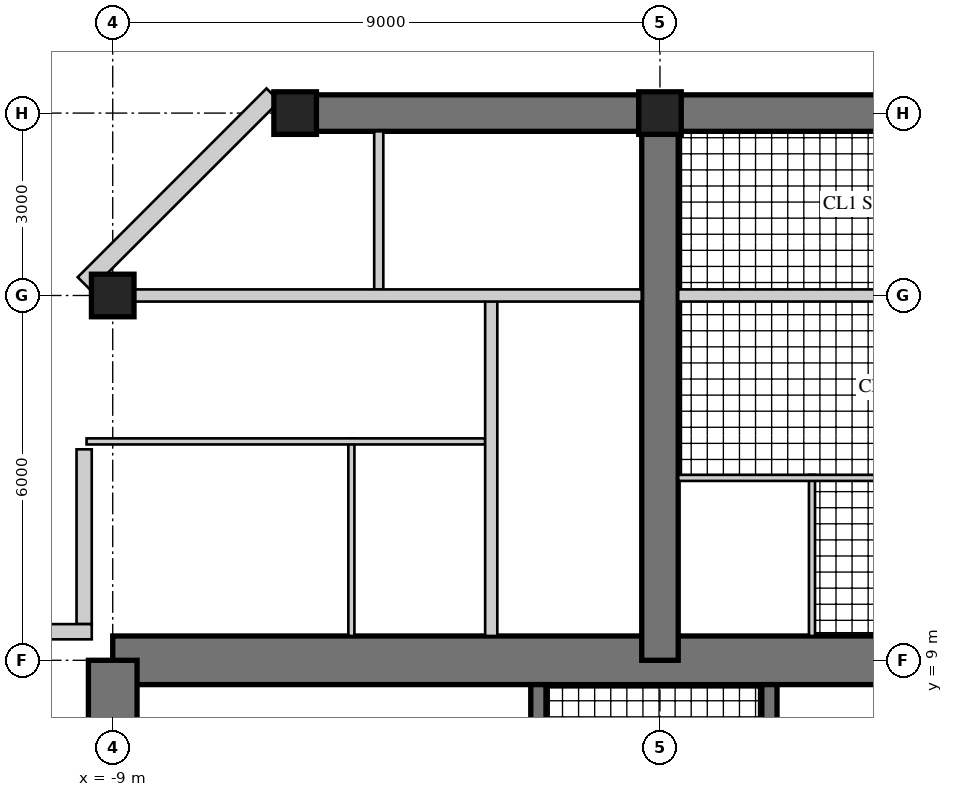
"""IFC4 building model, lengths in metres.
Left out: names, types, materials, properties, quantities, classifications, styles, units other than length and angle.
Written with IfcOpenShell. Run it as: python <this file> out.ifc"""

import sys

from ifc_helpers import new_model, si_unit, direction, frame, frame_2d, origin, origin_2d, place, context, subcontext, project, spatial, rectangle, hollow_rectangle, extrude, element, fill, save


model = new_model("IFC4")
c1 = context("Model", 3, precision=1e-05, world=origin(), true_north=direction((0.0, 1.0)))
c2 = subcontext(c1, "Body", "Model", "MODEL_VIEW")
j1 = project(units=[si_unit("LENGTHUNIT", "METRE"), si_unit("PLANEANGLEUNIT", "RADIAN")], contexts=[c1])
p1 = place(None, origin())
s1 = spatial("IfcSite", under=j1, at=p1, CompositionType="ELEMENT")
p2 = place(p1, origin())
s2 = spatial("IfcBuilding", under=s1, at=p2, CompositionType="ELEMENT")
p3 = place(p2, frame((0.0, 0.0, 261.1)))
s3 = spatial("IfcBuildingStorey", under=s2, at=p3, CompositionType="ELEMENT", Elevation=261.1)
p4 = place(p3, frame((9.0, 9.0, 0.0), z_axis=(0.0, 0.0, 1.0), x_axis=(-1.0, 0.0, 0.0)))
e1 = element("IfcWall", 1, at=p4, inside=s3, PredefinedType="SHEAR", context=c2, shape_type="SweptSolid", body=[
    extrude(rectangle(XDim=18.0, YDim=0.8, at=frame_2d((9.0, 0.0))), origin(), (0.0, 0.0, 1.0), 3.4),
])
p5 = place(p4, frame((9.8, 0.0, 0.0)))
e2 = element("IfcOpeningElement", 2, at=p5, cuts=e1, PredefinedType="OPENING", context=c2, shape_type="SweptSolid", body=[
    extrude(rectangle(XDim=1.0, YDim=2.4, at=frame_2d((0.5, 1.2))), frame((0.0, 0.41, 0.0), z_axis=(0.0, -1.0, 0.0), x_axis=(1.0, 0.0, 0.0)), (0.0, 0.0, 1.0), 0.82),
])
p6 = place(p3, frame((-9.0, 9.0, 0.0), z_axis=(0.0, 0.0, 1.0), x_axis=(0.0, -1.0, 0.0)))
e3 = element("IfcWall", 3, at=p6, inside=s3, PredefinedType="SHEAR", context=c2, shape_type="SweptSolid", body=[
    extrude(rectangle(XDim=18.0, YDim=0.8, at=frame_2d((9.0, 0.0))), origin(), (0.0, 0.0, 1.0), 3.4),
])
p7 = place(p6, frame((9.8, 0.0, 0.0)))
e4 = element("IfcOpeningElement", 4, at=p7, cuts=e3, PredefinedType="OPENING", context=c2, shape_type="SweptSolid", body=[
    extrude(rectangle(XDim=1.0, YDim=2.4, at=frame_2d((0.5, 1.2))), frame((0.0, 0.41, 0.0), z_axis=(0.0, -1.0, 0.0), x_axis=(1.0, 0.0, 0.0)), (0.0, 0.0, 1.0), 0.82),
])
p8 = place(p3, frame((1.8, 1.875, 0.0), z_axis=(0.0, 0.0, 1.0), x_axis=(0.0, 1.0, 0.0)))
e5 = element("IfcWall", 5, at=p8, inside=s3, PredefinedType="SHEAR", context=c2, shape_type="SweptSolid", body=[
    extrude(rectangle(XDim=6.725, YDim=0.25, at=frame_2d((3.363, 0.0))), origin(), (0.0, 0.0, 1.0), 3.4),
])
p9 = place(p8, frame((1.875, 0.0, 0.0)))
e6 = element("IfcOpeningElement", 6, at=p9, cuts=e5, PredefinedType="OPENING", context=c2, shape_type="SweptSolid", body=[
    extrude(rectangle(XDim=1.6, YDim=2.4, at=frame_2d((0.8, 1.2))), frame((0.0, 0.135, 0.0), z_axis=(0.0, -1.0, 0.0), x_axis=(1.0, 0.0, 0.0)), (0.0, 0.0, 1.0), 0.27),
])
p10 = place(p3, frame((-2.0, 1.675, 0.0), z_axis=(0.0, 0.0, 1.0), x_axis=(0.0, 1.0, 0.0)))
e7 = element("IfcWall", 7, at=p10, inside=s3, PredefinedType="SHEAR", context=c2, shape_type="SweptSolid", body=[
    extrude(rectangle(XDim=6.925, YDim=0.25, at=frame_2d((3.462, 0.0))), origin(), (0.0, 0.0, 1.0), 3.4),
])
p11 = place(p10, frame((0.725, 0.0, 0.0)))
e8 = element("IfcOpeningElement", 8, at=p11, cuts=e7, PredefinedType="OPENING", context=c2, shape_type="SweptSolid", body=[
    extrude(rectangle(XDim=1.0, YDim=2.1, at=frame_2d((0.5, 1.05))), frame((0.0, 0.135, 0.0), z_axis=(0.0, -1.0, 0.0), x_axis=(1.0, 0.0, 0.0)), (0.0, 0.0, 1.0), 0.27),
])
p12 = place(p3, frame((0.0, 9.0, 0.0), z_axis=(0.0, 0.0, 1.0), x_axis=(0.0, 1.0, 0.0)))
e9 = element("IfcWall", 9, at=p12, inside=s3, PredefinedType="SHEAR", context=c2, shape_type="SweptSolid", body=[
    extrude(rectangle(XDim=9.0, YDim=0.6, at=frame_2d((4.5, 0.0))), origin(), (0.0, 0.0, 1.0), 3.4),
])
p13 = place(p12, frame((3.8, 0.0, 0.0)))
e10 = element("IfcOpeningElement", 10, at=p13, cuts=e9, PredefinedType="OPENING", context=c2, shape_type="SweptSolid", body=[
    extrude(rectangle(XDim=1.0, YDim=2.15, at=frame_2d((0.5, 1.075))), frame((0.0, 0.31, 0.0), z_axis=(0.0, -1.0, 0.0), x_axis=(1.0, 0.0, 0.0)), (0.0, 0.0, 1.0), 0.62),
])
p14 = place(p12, frame((7.0, 0.0, 0.0)))
e11 = element("IfcOpeningElement", 11, at=p14, cuts=e9, PredefinedType="OPENING", context=c2, shape_type="SweptSolid", body=[
    extrude(rectangle(XDim=1.0, YDim=2.2, at=frame_2d((0.5, 1.1))), frame((0.0, 0.31, 0.0), z_axis=(0.0, -1.0, 0.0), x_axis=(1.0, 0.0, 0.0)), (0.0, 0.0, 1.0), 0.62),
])
p15 = place(p3, frame((6.0, 18.0, 0.0), z_axis=(0.0, 0.0, 1.0), x_axis=(-1.0, 0.0, 0.0)))
e12 = element("IfcWall", 12, at=p15, inside=s3, PredefinedType="SHEAR", context=c2, shape_type="SweptSolid", body=[
    extrude(rectangle(XDim=12.0, YDim=0.6, at=frame_2d((6.0, 0.0))), origin(), (0.0, 0.0, 1.0), 3.4),
])
p16 = place(p15, frame((1.625, 0.0, 0.6)))
e13 = element("IfcOpeningElement", 13, at=p16, cuts=e12, PredefinedType="OPENING", context=c2, shape_type="SweptSolid", body=[
    extrude(rectangle(XDim=3.0, YDim=2.4, at=frame_2d((1.5, 1.2))), frame((0.0, 0.31, 0.0), z_axis=(0.0, -1.0, 0.0), x_axis=(1.0, 0.0, 0.0)), (0.0, 0.0, 1.0), 0.62),
])
p17 = place(p15, frame((7.375, 0.0, 0.6)))
e14 = element("IfcOpeningElement", 14, at=p17, cuts=e12, PredefinedType="OPENING", context=c2, shape_type="SweptSolid", body=[
    extrude(rectangle(XDim=3.0, YDim=2.4, at=frame_2d((1.5, 1.2))), frame((0.0, 0.31, 0.0), z_axis=(0.0, -1.0, 0.0), x_axis=(1.0, 0.0, 0.0)), (0.0, 0.0, 1.0), 0.62),
])
for number, where, z_axis, x_axis in (
    (15, (-9.0, 15.0, 0.0), (0.0, 0.0, 1.0), (1.0, 0.0, 0.0)),
    (16, (0.0, 18.0, 0.0), (0.0, 0.0, 1.0), (1.0, 0.0, 0.0)),
    (17, (-6.0, 18.0, 0.0), (0.0, 0.0, 1.0), (1.0, 0.0, 0.0)),
):
    element("IfcColumn", number, at=place(p3, frame(where, z_axis=z_axis, x_axis=x_axis)), inside=s3, PredefinedType="COLUMN", context=c2, shape_type="SweptSolid", body=[
        extrude(rectangle(XDim=0.7, YDim=0.7, at=origin_2d()), origin(), (0.0, 0.0, 1.0), 3.4),
    ])
p18 = place(p3, frame((-6.365, 18.3, 0.0), z_axis=(0.0, 0.0, 1.0), x_axis=(-0.70707898447, -0.707134576811, 0.0)))
e18 = element("IfcWall", 18, at=p18, inside=s3, PredefinedType="SOLIDWALL", context=c2, shape_type="SweptSolid", body=[
    extrude(rectangle(XDim=4.392, YDim=0.3, at=frame_2d((2.196, 0.0))), origin(), (0.0, 0.0, 1.0), 3.22),
])
p19 = place(p18, frame((1.746, 0.0, 0.3)))
e19 = element("IfcOpeningElement", 19, at=p19, cuts=e18, PredefinedType="OPENING", context=c2, shape_type="SweptSolid", body=[
    extrude(rectangle(XDim=0.9, YDim=2.4, at=frame_2d((0.45, 1.2))), frame((0.0, 0.16, 0.0), z_axis=(0.0, -1.0, 0.0), x_axis=(1.0, 0.0, 0.0)), (0.0, 0.0, 1.0), 0.32),
])
p20 = place(p3, frame((-9.47, 12.47, 0.0), z_axis=(0.0, 0.0, 1.0), x_axis=(0.0, -1.0, 0.0)))
e20 = element("IfcWall", 20, at=p20, inside=s3, PredefinedType="SOLIDWALL", context=c2, shape_type="SweptSolid", body=[
    extrude(rectangle(XDim=2.875, YDim=0.25, at=frame_2d((1.438, 0.0))), origin(), (0.0, 0.0, 1.0), 3.22),
])
p21 = place(p20, frame((0.6, 0.0, 0.0)))
e21 = element("IfcOpeningElement", 21, at=p21, cuts=e20, PredefinedType="OPENING", context=c2, shape_type="SweptSolid", body=[
    extrude(rectangle(XDim=1.0, YDim=2.2, at=frame_2d((0.5, 1.1))), frame((0.0, 0.135, 0.0), z_axis=(0.0, -1.0, 0.0), x_axis=(1.0, 0.0, 0.0)), (0.0, 0.0, 1.0), 0.27),
])
p22 = place(p3, frame((-9.345, 9.47, 0.0), z_axis=(0.0, 0.0, 1.0), x_axis=(-1.0, 0.0, 0.0)))
e22 = element("IfcWall", 22, at=p22, inside=s3, PredefinedType="SOLIDWALL", context=c2, shape_type="SweptSolid", body=[
    extrude(rectangle(XDim=3.125, YDim=0.25, at=frame_2d((1.562, 0.0))), origin(), (0.0, 0.0, 1.0), 3.22),
])
p23 = place(p22, frame((0.6, 0.0, 0.0)))
e23 = element("IfcOpeningElement", 23, at=p23, cuts=e22, PredefinedType="OPENING", context=c2, shape_type="SweptSolid", body=[
    extrude(rectangle(XDim=1.0, YDim=2.2, at=frame_2d((0.5, 1.1))), frame((0.0, 0.135, 0.0), z_axis=(0.0, -1.0, 0.0), x_axis=(1.0, 0.0, 0.0)), (0.0, 0.0, 1.0), 0.27),
])
p24 = place(p3, frame((-5.075, 9.4, 0.0), z_axis=(0.0, 0.0, 1.0), x_axis=(0.0, 1.0, 0.0)))
e24 = element("IfcWall", 24, at=p24, inside=s3, PredefinedType="PARTITIONING", context=c2, shape_type="SweptSolid", body=[
    extrude(rectangle(XDim=3.25, YDim=0.1, at=frame_2d((1.625, 0.0))), origin(), (0.0, 0.0, 1.0), 3.22),
])
p25 = place(p3, frame((-2.875, 12.6, 0.0), z_axis=(0.0, 0.0, 1.0), x_axis=(-1.0, 0.0, 0.0)))
e25 = element("IfcWall", 25, at=p25, inside=s3, PredefinedType="PARTITIONING", context=c2, shape_type="SweptSolid", body=[
    extrude(rectangle(XDim=6.555, YDim=0.1, at=frame_2d((3.277, 0.0))), origin(), (0.0, 0.0, 1.0), 3.22),
])
p26 = place(p25, frame((0.55, 0.0, 0.0)))
e26 = element("IfcOpeningElement", 26, at=p26, cuts=e25, PredefinedType="OPENING", context=c2, shape_type="SweptSolid", body=[
    extrude(rectangle(XDim=0.9, YDim=2.1, at=frame_2d((0.45, 1.05))), frame((0.0, 0.06, 0.0), z_axis=(0.0, -1.0, 0.0), x_axis=(1.0, 0.0, 0.0)), (0.0, 0.0, 1.0), 0.12),
])
p27 = place(p25, frame((2.65, 0.0, 0.0)))
e27 = element("IfcOpeningElement", 27, at=p27, cuts=e25, PredefinedType="OPENING", context=c2, shape_type="SweptSolid", body=[
    extrude(rectangle(XDim=0.9, YDim=2.1, at=frame_2d((0.45, 1.05))), frame((0.0, 0.06, 0.0), z_axis=(0.0, -1.0, 0.0), x_axis=(1.0, 0.0, 0.0)), (0.0, 0.0, 1.0), 0.12),
])
p28 = place(p3, frame((2.5, 9.4, 0.0), z_axis=(0.0, 0.0, 1.0), x_axis=(0.0, 1.0, 0.0)))
e28 = element("IfcWall", 28, at=p28, inside=s3, PredefinedType="PARTITIONING", context=c2, shape_type="SweptSolid", body=[
    extrude(rectangle(XDim=2.65, YDim=0.1, at=frame_2d((1.325, 0.0))), origin(), (0.0, 0.0, 1.0), 3.22),
])
p29 = place(p3, frame((9.345, 12.0, 0.0), z_axis=(0.0, 0.0, 1.0), x_axis=(-1.0, 0.0, 0.0)))
e29 = element("IfcWall", 29, at=p29, inside=s3, PredefinedType="PARTITIONING", context=c2, shape_type="SweptSolid", body=[
    extrude(rectangle(XDim=9.045, YDim=0.1, at=frame_2d((4.522, 0.0))), origin(), (0.0, 0.0, 1.0), 3.22),
])
p30 = place(p29, frame((5.495, 0.0, 0.0)))
e30 = element("IfcOpeningElement", 30, at=p30, cuts=e29, PredefinedType="OPENING", context=c2, shape_type="SweptSolid", body=[
    extrude(rectangle(XDim=0.9, YDim=2.1, at=frame_2d((0.45, 1.05))), frame((0.0, 0.06, 0.0), z_axis=(0.0, -1.0, 0.0), x_axis=(1.0, 0.0, 0.0)), (0.0, 0.0, 1.0), 0.12),
])
p31 = place(p29, frame((7.595, 0.0, 0.0)))
e31 = element("IfcOpeningElement", 31, at=p31, cuts=e29, PredefinedType="OPENING", context=c2, shape_type="SweptSolid", body=[
    extrude(rectangle(XDim=0.9, YDim=2.1, at=frame_2d((0.45, 1.05))), frame((0.0, 0.06, 0.0), z_axis=(0.0, -1.0, 0.0), x_axis=(1.0, 0.0, 0.0)), (0.0, 0.0, 1.0), 0.12),
])
p32 = place(p3, frame((-2.775, 9.4, 0.0), z_axis=(0.0, 0.0, 1.0), x_axis=(0.0, 1.0, 0.0)))
e32 = element("IfcWall", 32, at=p32, inside=s3, PredefinedType="SOLIDWALL", context=c2, shape_type="SweptSolid", body=[
    extrude(rectangle(XDim=5.6, YDim=0.2, at=frame_2d((2.8, 0.0))), origin(), (0.0, 0.0, 1.0), 3.22),
])
p33 = place(p32, frame((3.75, 0.0, 0.0)))
e33 = element("IfcOpeningElement", 33, at=p33, cuts=e32, PredefinedType="OPENING", context=c2, shape_type="SweptSolid", body=[
    extrude(rectangle(XDim=1.0, YDim=2.15, at=frame_2d((0.5, 1.075))), frame((0.0, 0.11, 0.0), z_axis=(0.0, -1.0, 0.0), x_axis=(1.0, 0.0, 0.0)), (0.0, 0.0, 1.0), 0.22),
])
p34 = place(p3, frame((-4.625, 15.1, 0.0), z_axis=(0.0, 0.0, 1.0), x_axis=(0.0, 1.0, 0.0)))
e34 = element("IfcWall", 34, at=p34, inside=s3, PredefinedType="PARTITIONING", context=c2, shape_type="SweptSolid", body=[
    extrude(rectangle(XDim=2.6, YDim=0.15, at=frame_2d((1.3, 0.0))), origin(), (0.0, 0.0, 1.0), 3.22),
])
p35 = place(p34, frame((0.6, 0.0, 0.0)))
e35 = element("IfcOpeningElement", 35, at=p35, cuts=e34, PredefinedType="OPENING", context=c2, shape_type="SweptSolid", body=[
    extrude(rectangle(XDim=1.0, YDim=2.1, at=frame_2d((0.5, 1.05))), frame((0.0, 0.085, 0.0), z_axis=(0.0, -1.0, 0.0), x_axis=(1.0, 0.0, 0.0)), (0.0, 0.0, 1.0), 0.17),
])
p36 = place(p3, frame((8.65, 15.0, 0.0), z_axis=(0.0, 0.0, 1.0), x_axis=(-1.0, 0.0, 0.0)))
e36 = element("IfcWall", 36, at=p36, inside=s3, PredefinedType="SOLIDWALL", context=c2, shape_type="SweptSolid", body=[
    extrude(rectangle(XDim=8.35, YDim=0.2, at=frame_2d((4.175, 0.0))), origin(), (0.0, 0.0, 1.0), 2.52),
])
p37 = place(p3, frame((-0.3, 15.0, 0.0), z_axis=(0.0, 0.0, 1.0), x_axis=(-1.0, 0.0, 0.0)))
e37 = element("IfcWall", 37, at=p37, inside=s3, PredefinedType="SOLIDWALL", context=c2, shape_type="SweptSolid", body=[
    extrude(rectangle(XDim=8.35, YDim=0.2, at=frame_2d((4.175, 0.0))), origin(), (0.0, 0.0, 1.0), 2.52),
])
p38 = place(p37, frame((0.4, 0.0, 0.0)))
e38 = element("IfcOpeningElement", 38, at=p38, cuts=e37, PredefinedType="OPENING", context=c2, shape_type="SweptSolid", body=[
    extrude(rectangle(XDim=1.0, YDim=2.2, at=frame_2d((0.5, 1.1))), frame((0.0, 0.11, 0.0), z_axis=(0.0, -1.0, 0.0), x_axis=(1.0, 0.0, 0.0)), (0.0, 0.0, 1.0), 0.22),
])
p39 = place(p16, origin())
e39 = element("IfcWindow", 39, at=p39, inside=s3, PartitioningType="SINGLE_PANEL", PredefinedType="WINDOW", context=c2, shape_type="SweptSolid", body=[
    extrude(hollow_rectangle(XDim=3.0, YDim=2.4, WallThickness=0.06, at=frame_2d((1.5, 1.2))), frame((0.0, 0.03, 0.0), z_axis=(0.0, -1.0, 0.0), x_axis=(1.0, 0.0, 0.0)), (0.0, 0.0, 1.0), 0.06),
    extrude(rectangle(XDim=2.879, YDim=2.279, at=frame_2d((1.5, 1.2))), frame((0.0, 0.03, 0.0), z_axis=(0.0, -1.0, 0.0), x_axis=(1.0, 0.0, 0.0)), (0.0, 0.0, 1.0), 0.06),
])
fill(e13, e39)
p40 = place(p17, origin())
e40 = element("IfcWindow", 40, at=p40, inside=s3, PartitioningType="SINGLE_PANEL", PredefinedType="WINDOW", context=c2, shape_type="SweptSolid", body=[
    extrude(hollow_rectangle(XDim=3.0, YDim=2.4, WallThickness=0.06, at=frame_2d((1.5, 1.2))), frame((0.0, 0.03, 0.0), z_axis=(0.0, -1.0, 0.0), x_axis=(1.0, 0.0, 0.0)), (0.0, 0.0, 1.0), 0.06),
    extrude(rectangle(XDim=2.879, YDim=2.279, at=frame_2d((1.5, 1.2))), frame((0.0, 0.03, 0.0), z_axis=(0.0, -1.0, 0.0), x_axis=(1.0, 0.0, 0.0)), (0.0, 0.0, 1.0), 0.06),
])
fill(e14, e40)
p41 = place(p19, origin())
e41 = element("IfcWindow", 41, at=p41, inside=s3, PartitioningType="SINGLE_PANEL", PredefinedType="WINDOW", context=c2, shape_type="SweptSolid", body=[
    extrude(hollow_rectangle(XDim=0.9, YDim=2.4, WallThickness=0.06, at=frame_2d((0.45, 1.2))), frame((0.0, 0.03, 0.0), z_axis=(0.0, -1.0, 0.0), x_axis=(1.0, 0.0, 0.0)), (0.0, 0.0, 1.0), 0.06),
    extrude(rectangle(XDim=0.779, YDim=2.279, at=frame_2d((0.45, 1.2))), frame((0.0, 0.03, 0.0), z_axis=(0.0, -1.0, 0.0), x_axis=(1.0, 0.0, 0.0)), (0.0, 0.0, 1.0), 0.06),
])
fill(e19, e41)
p42 = place(p21, origin())
e42 = element("IfcDoor", 42, at=p42, inside=s3, OperationType="SINGLE_SWING_LEFT", PredefinedType="DOOR", context=c2, shape_type="SweptSolid", body=[
    extrude(hollow_rectangle(XDim=1.0, YDim=2.2, WallThickness=0.06, at=frame_2d((0.5, 1.1))), frame((0.0, 0.025, 0.0), z_axis=(0.0, -1.0, 0.0), x_axis=(1.0, 0.0, 0.0)), (0.0, 0.0, 1.0), 0.05),
    extrude(rectangle(XDim=0.879, YDim=2.079, at=frame_2d((0.5, 1.1))), frame((0.0, 0.025, 0.0), z_axis=(0.0, -1.0, 0.0), x_axis=(1.0, 0.0, 0.0)), (0.0, 0.0, 1.0), 0.05),
])
fill(e21, e42)
p43 = place(p23, origin())
e43 = element("IfcDoor", 43, at=p43, inside=s3, OperationType="SINGLE_SWING_LEFT", PredefinedType="DOOR", context=c2, shape_type="SweptSolid", body=[
    extrude(hollow_rectangle(XDim=1.0, YDim=2.2, WallThickness=0.06, at=frame_2d((0.5, 1.1))), frame((0.0, 0.025, 0.0), z_axis=(0.0, -1.0, 0.0), x_axis=(1.0, 0.0, 0.0)), (0.0, 0.0, 1.0), 0.05),
    extrude(rectangle(XDim=0.879, YDim=2.079, at=frame_2d((0.5, 1.1))), frame((0.0, 0.025, 0.0), z_axis=(0.0, -1.0, 0.0), x_axis=(1.0, 0.0, 0.0)), (0.0, 0.0, 1.0), 0.05),
])
fill(e23, e43)
p44 = place(p26, origin())
e44 = element("IfcDoor", 44, at=p44, inside=s3, OperationType="SINGLE_SWING_LEFT", PredefinedType="DOOR", context=c2, shape_type="SweptSolid", body=[
    extrude(rectangle(XDim=0.9, YDim=2.1, at=frame_2d((0.45, 1.05))), frame((0.0, 0.025, 0.0), z_axis=(0.0, -1.0, 0.0), x_axis=(1.0, 0.0, 0.0)), (0.0, 0.0, 1.0), 0.05),
])
fill(e26, e44)
p45 = place(p27, origin())
e45 = element("IfcDoor", 45, at=p45, inside=s3, OperationType="SINGLE_SWING_LEFT", PredefinedType="DOOR", context=c2, shape_type="SweptSolid", body=[
    extrude(rectangle(XDim=0.9, YDim=2.1, at=frame_2d((0.45, 1.05))), frame((0.0, 0.025, 0.0), z_axis=(0.0, -1.0, 0.0), x_axis=(1.0, 0.0, 0.0)), (0.0, 0.0, 1.0), 0.05),
])
fill(e27, e45)
p46 = place(p30, origin())
e46 = element("IfcDoor", 46, at=p46, inside=s3, OperationType="SINGLE_SWING_RIGHT", PredefinedType="DOOR", context=c2, shape_type="SweptSolid", body=[
    extrude(rectangle(XDim=0.9, YDim=2.1, at=frame_2d((0.45, 1.05))), frame((0.0, 0.025, 0.0), z_axis=(0.0, -1.0, 0.0), x_axis=(1.0, 0.0, 0.0)), (0.0, 0.0, 1.0), 0.05),
])
fill(e30, e46)
p47 = place(p31, origin())
e47 = element("IfcDoor", 47, at=p47, inside=s3, OperationType="SINGLE_SWING_RIGHT", PredefinedType="DOOR", context=c2, shape_type="SweptSolid", body=[
    extrude(rectangle(XDim=0.9, YDim=2.1, at=frame_2d((0.45, 1.05))), frame((0.0, 0.025, 0.0), z_axis=(0.0, -1.0, 0.0), x_axis=(1.0, 0.0, 0.0)), (0.0, 0.0, 1.0), 0.05),
])
fill(e31, e47)
p48 = place(p33, origin())
e48 = element("IfcDoor", 48, at=p48, inside=s3, OperationType="SINGLE_SWING_LEFT", PredefinedType="DOOR", context=c2, shape_type="SweptSolid", body=[
    extrude(rectangle(XDim=1.0, YDim=2.15, at=frame_2d((0.5, 1.075))), frame((0.0, 0.025, 0.0), z_axis=(0.0, -1.0, 0.0), x_axis=(1.0, 0.0, 0.0)), (0.0, 0.0, 1.0), 0.05),
])
fill(e33, e48)
p49 = place(p35, origin())
e49 = element("IfcDoor", 49, at=p49, inside=s3, OperationType="SINGLE_SWING_LEFT", PredefinedType="DOOR", context=c2, shape_type="SweptSolid", body=[
    extrude(rectangle(XDim=1.0, YDim=2.1, at=frame_2d((0.5, 1.05))), frame((0.0, 0.025, 0.0), z_axis=(0.0, -1.0, 0.0), x_axis=(1.0, 0.0, 0.0)), (0.0, 0.0, 1.0), 0.05),
])
fill(e35, e49)
p50 = place(p38, frame((1.0, 0.0, 0.0), z_axis=(0.0, 0.0, 1.0), x_axis=(-1.0, 0.0, 0.0)))
e50 = element("IfcDoor", 50, at=p50, inside=s3, OperationType="SINGLE_SWING_RIGHT", PredefinedType="DOOR", context=c2, shape_type="SweptSolid", body=[
    extrude(rectangle(XDim=1.0, YDim=2.2, at=frame_2d((0.5, 1.1))), frame((0.0, 0.025, 0.0), z_axis=(0.0, -1.0, 0.0), x_axis=(1.0, 0.0, 0.0)), (0.0, 0.0, 1.0), 0.05),
])
fill(e38, e50)
p51 = place(p13, frame((1.0, 0.0, 0.0), z_axis=(0.0, 0.0, 1.0), x_axis=(-1.0, 0.0, 0.0)))
e51 = element("IfcDoor", 51, at=p51, inside=s3, OperationType="SINGLE_SWING_RIGHT", PredefinedType="DOOR", context=c2, shape_type="SweptSolid", body=[
    extrude(rectangle(XDim=1.0, YDim=2.15, at=frame_2d((0.5, 1.075))), frame((0.0, 0.025, 0.0), z_axis=(0.0, -1.0, 0.0), x_axis=(1.0, 0.0, 0.0)), (0.0, 0.0, 1.0), 0.05),
])
fill(e10, e51)
p52 = place(p14, origin())
e52 = element("IfcDoor", 52, at=p52, inside=s3, OperationType="SINGLE_SWING_RIGHT", PredefinedType="DOOR", context=c2, shape_type="SweptSolid", body=[
    extrude(rectangle(XDim=1.0, YDim=2.2, at=frame_2d((0.5, 1.1))), frame((0.0, 0.025, 0.0), z_axis=(0.0, -1.0, 0.0), x_axis=(1.0, 0.0, 0.0)), (0.0, 0.0, 1.0), 0.05),
])
fill(e11, e52)
p53 = place(p5, origin())
e53 = element("IfcDoor", 53, at=p53, inside=s3, OperationType="SINGLE_SWING_RIGHT", PredefinedType="DOOR", context=c2, shape_type="SweptSolid", body=[
    extrude(rectangle(XDim=1.0, YDim=2.4, at=frame_2d((0.5, 1.2))), frame((0.0, 0.055, 0.0), z_axis=(0.0, -1.0, 0.0), x_axis=(1.0, 0.0, 0.0)), (0.0, 0.0, 1.0), 0.05),
])
fill(e2, e53)
save(model, sys.argv[1])
